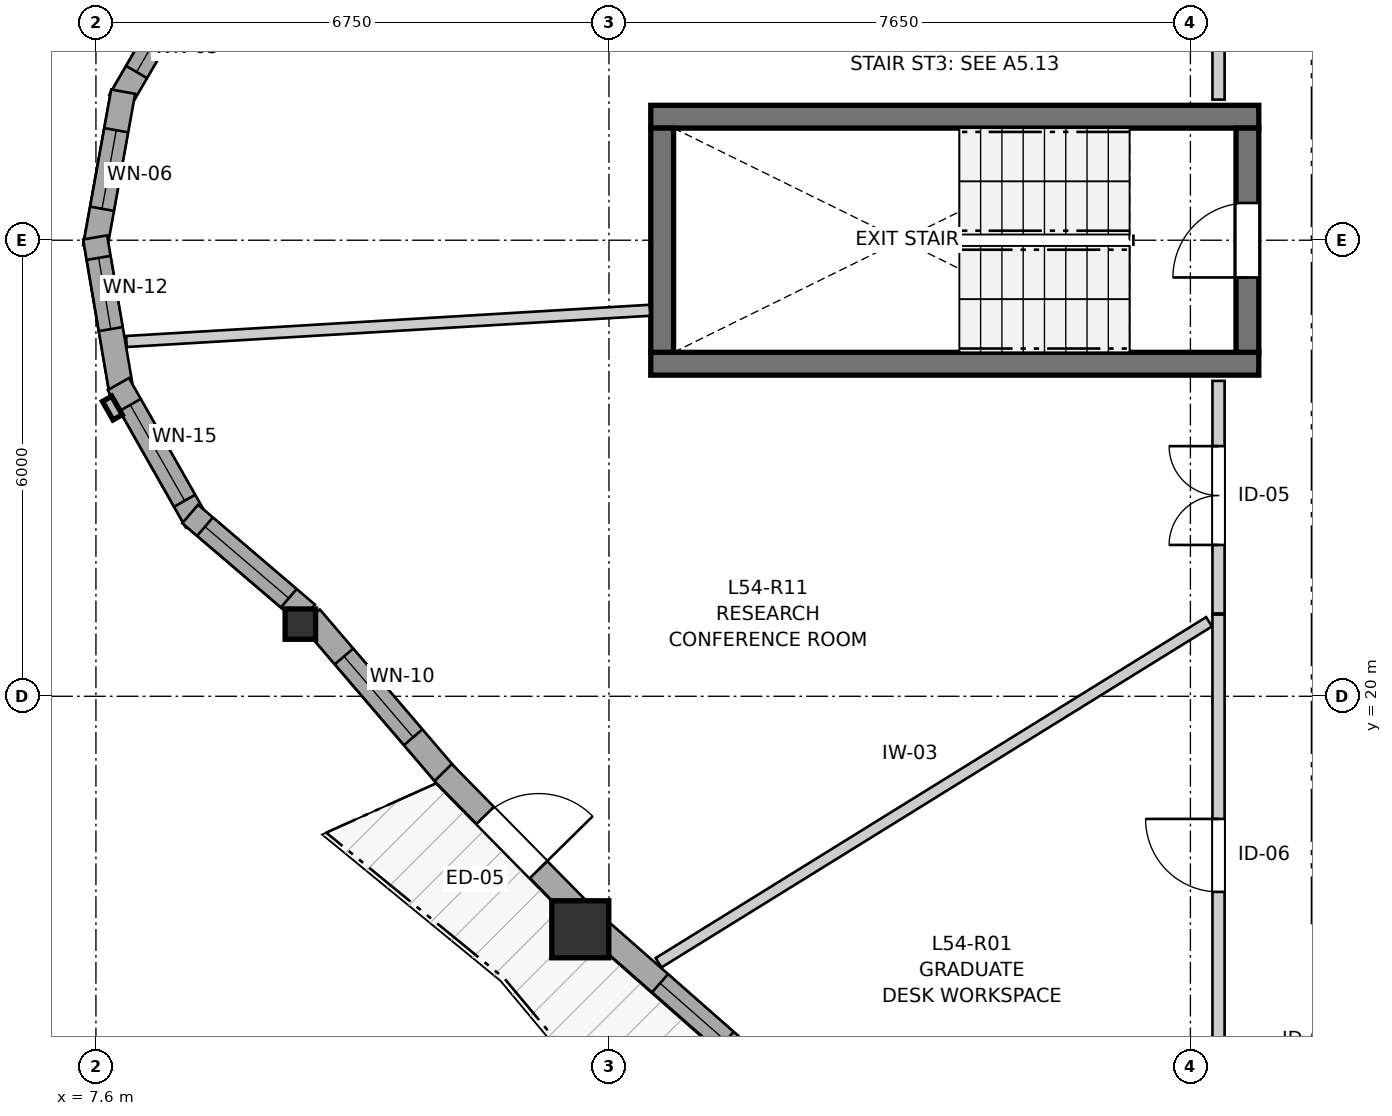
"""IFC4 building model, lengths in metres.
Left out: names, types, materials, properties, quantities, classifications, styles, units other than length and angle.
Written with IfcOpenShell. Run it as: python <this file> out.ifc"""

import sys

from ifc_helpers import new_model, si_unit, direction, frame, frame_2d, origin, origin_2d, place, context, subcontext, project, spatial, rectangle, i_section, extrude, source, transform, mapped, element, fill, save


model = new_model("IFC4")
c1 = context("Model", 3, precision=1e-05, world=origin(), true_north=direction((0.0, 1.0)))
c2 = subcontext(c1, "Body", "Model", "MODEL_VIEW")
j1 = project(units=[si_unit("LENGTHUNIT", "METRE"), si_unit("PLANEANGLEUNIT", "RADIAN")], contexts=[c1])
p1 = place(None, origin())
s1 = spatial("IfcSite", under=j1, at=p1, CompositionType="ELEMENT")
p2 = place(p1, origin())
s2 = spatial("IfcBuilding", under=s1, at=p2, CompositionType="ELEMENT")
p3 = place(p2, frame((0.0, 0.0, 181.0)))
s3 = spatial("IfcBuildingStorey", under=s2, at=p3, CompositionType="ELEMENT", Elevation=181.0)
for number, where, z_axis, x_axis in (
    (1, (14.9, 24.375, 0.0), (0.0, 0.0, 1.0), (1.0, 0.0, 0.0)),
    (2, (22.9, 27.625, 0.0), (0.0, 0.0, 1.0), (-1.0, 0.0, 0.0)),
):
    element("IfcWall", number, at=place(p3, frame(where, z_axis=z_axis, x_axis=x_axis)), inside=s3, PredefinedType="SHEAR", context=c2, shape_type="SweptSolid", body=[
        extrude(rectangle(XDim=8.0, YDim=0.3, at=frame_2d((4.0, 0.0))), origin(), (0.0, 0.0, 1.0), 2.95),
    ])
p4 = place(p3, frame((15.05, 27.475, 0.0), z_axis=(0.0, 0.0, 1.0), x_axis=(0.0, -1.0, 0.0)))
e3 = element("IfcWall", 3, at=p4, inside=s3, PredefinedType="SHEAR", context=c2, shape_type="SweptSolid", body=[
    extrude(rectangle(XDim=2.95, YDim=0.3, at=frame_2d((1.475, 0.0))), origin(), (0.0, 0.0, 1.0), 2.95),
])
p5 = place(p3, frame((22.75, 24.525, 0.0), z_axis=(0.0, 0.0, 1.0), x_axis=(0.0, 1.0, 0.0)))
e4 = element("IfcWall", 4, at=p5, inside=s3, PredefinedType="SHEAR", context=c2, shape_type="SweptSolid", body=[
    extrude(rectangle(XDim=2.95, YDim=0.3, at=frame_2d((1.475, 0.0))), origin(), (0.0, 0.0, 1.0), 2.95),
])
p6 = place(p5, frame((0.985, 0.0, 0.0)))
e5 = element("IfcOpeningElement", 5, at=p6, cuts=e4, PredefinedType="OPENING", context=c2, shape_type="SweptSolid", body=[
    extrude(rectangle(XDim=0.98, YDim=2.15, at=frame_2d((0.49, 1.075))), frame((0.0, 0.16, 0.0), z_axis=(0.0, -1.0, 0.0), x_axis=(1.0, 0.0, 0.0)), (0.0, 0.0, 1.0), 0.32),
])
m1 = source(origin(), c2, "Body", "SweptSolid", [
    extrude(i_section(OverallWidth=0.401, OverallDepth=0.399, WebThickness=0.023, FlangeThickness=0.036, FilletRadius=0.015, at=origin_2d()), origin(), (0.0, 0.0, 1.0), 2.95),
])
p7 = place(p3, frame((10.289, 20.95, 0.0), z_axis=(0.0, 0.0, 1.0), x_axis=(1.0, 0.0, 0.0)))
e6 = element("IfcColumn", 6, at=p7, inside=s3, PredefinedType="PILASTER", context=c2, shape_type="MappedRepresentation", body=[
    mapped(m1, transform((0.0, 0.0, 0.0), x_axis=(1.0, 0.0, 0.0), y_axis=(0.0, 1.0, 0.0), z_axis=(0.0, 0.0, 1.0), scale=1.0)),
])
m2 = source(origin(), c2, "Body", "SweptSolid", [
    extrude(rectangle(XDim=0.75, YDim=0.75, at=origin_2d()), origin(), (0.0, 0.0, 1.0), 2.95),
])
p8 = place(p3, frame((13.973, 16.935, 0.0), z_axis=(0.0, 0.0, 1.0), x_axis=(1.0, 0.0, 0.0)))
e7 = element("IfcColumn", 7, at=p8, inside=s3, PredefinedType="COLUMN", context=c2, shape_type="MappedRepresentation", body=[
    mapped(m2, transform((0.0, 0.0, 0.0), x_axis=(1.0, 0.0, 0.0), y_axis=(0.0, 1.0, 0.0), z_axis=(0.0, 0.0, 1.0), scale=1.0)),
])
p9 = place(p3, frame((8.958, 29.632, 0.0), z_axis=(0.0, 0.0, 1.0), x_axis=(-0.502053430046, -0.864836605018, 0.0)))
e8 = element("IfcWall", 8, at=p9, inside=s3, PredefinedType="SOLIDWALL", context=c2, shape_type="SweptSolid", body=[
    extrude(rectangle(XDim=2.081, YDim=0.32, at=frame_2d((1.041, 0.0))), origin(), (0.0, 0.0, 1.0), 2.53),
])
p10 = place(p9, frame((0.44, 0.0, 0.82)))
e9 = element("IfcOpeningElement", 9, at=p10, cuts=e8, PredefinedType="OPENING", context=c2, shape_type="SweptSolid", body=[
    extrude(rectangle(XDim=1.2, YDim=1.45, at=frame_2d((0.6, 0.725))), frame((0.0, 0.17, 0.0), z_axis=(0.0, -1.0, 0.0), x_axis=(1.0, 0.0, 0.0)), (0.0, 0.0, 1.0), 0.34),
])
p11 = place(p3, frame((7.958, 27.954, 0.0), z_axis=(0.0, 0.0, 1.0), x_axis=(-0.177625721103, -0.984098116654, 0.0)))
e10 = element("IfcWall", 10, at=p11, inside=s3, PredefinedType="SOLIDWALL", context=c2, shape_type="SweptSolid", body=[
    extrude(rectangle(XDim=2.081, YDim=0.32, at=frame_2d((1.041, 0.0))), origin(), (0.0, 0.0, 1.0), 2.53),
])
p12 = place(p11, frame((0.515, 0.0, 0.82)))
e11 = element("IfcOpeningElement", 11, at=p12, cuts=e10, PredefinedType="OPENING", context=c2, shape_type="SweptSolid", body=[
    extrude(rectangle(XDim=1.05, YDim=1.45, at=frame_2d((0.525, 0.725))), frame((0.0, 0.17, 0.0), z_axis=(0.0, -1.0, 0.0), x_axis=(1.0, 0.0, 0.0)), (0.0, 0.0, 1.0), 0.34),
])
p13 = place(p3, frame((7.59, 26.037, 0.0), z_axis=(0.0, 0.0, 1.0), x_axis=(0.167993405511, -0.985788119073, 0.0)))
e12 = element("IfcWall", 12, at=p13, inside=s3, PredefinedType="SOLIDWALL", context=c2, shape_type="SweptSolid", body=[
    extrude(rectangle(XDim=2.081, YDim=0.32, at=frame_2d((1.041, 0.0))), origin(), (0.0, 0.0, 1.0), 2.53),
])
p14 = place(p13, frame((0.273, 0.0, 0.82)))
e13 = element("IfcOpeningElement", 13, at=p14, cuts=e12, PredefinedType="OPENING", context=c2, shape_type="SweptSolid", body=[
    extrude(rectangle(XDim=0.95, YDim=1.35, at=frame_2d((0.475, 0.675))), frame((0.0, 0.17, 0.0), z_axis=(0.0, -1.0, 0.0), x_axis=(1.0, 0.0, 0.0)), (0.0, 0.0, 1.0), 0.34),
])
p15 = place(p3, frame((7.896, 24.108, 0.0), z_axis=(0.0, 0.0, 1.0), x_axis=(0.493660675866, -0.869654607936, 0.0)))
e14 = element("IfcWall", 14, at=p15, inside=s3, PredefinedType="SOLIDWALL", context=c2, shape_type="SweptSolid", body=[
    extrude(rectangle(XDim=2.081, YDim=0.32, at=frame_2d((1.041, 0.0))), origin(), (0.0, 0.0, 1.0), 2.53),
])
p16 = place(p15, frame((0.315, 0.0, 0.82)))
e15 = element("IfcOpeningElement", 15, at=p16, cuts=e14, PredefinedType="OPENING", context=c2, shape_type="SweptSolid", body=[
    extrude(rectangle(XDim=1.45, YDim=1.25, at=frame_2d((0.725, 0.625))), frame((0.0, 0.17, 0.0), z_axis=(0.0, -1.0, 0.0), x_axis=(1.0, 0.0, 0.0)), (0.0, 0.0, 1.0), 0.34),
])
p17 = place(p3, frame((8.84, 22.398, 0.0), z_axis=(0.0, 0.0, 1.0), x_axis=(0.760328975209, -0.649538181678, 0.0)))
e16 = element("IfcWall", 16, at=p17, inside=s3, PredefinedType="SOLIDWALL", context=c2, shape_type="SweptSolid", body=[
    extrude(rectangle(XDim=2.023, YDim=0.32, at=frame_2d((1.011, 0.0))), origin(), (0.0, 0.0, 1.0), 2.53),
])
p18 = place(p17, frame((0.257, 0.0, 0.82)))
e17 = element("IfcOpeningElement", 17, at=p18, cuts=e16, PredefinedType="OPENING", context=c2, shape_type="SweptSolid", body=[
    extrude(rectangle(XDim=1.45, YDim=1.25, at=frame_2d((0.725, 0.625))), frame((0.0, 0.17, 0.0), z_axis=(0.0, -1.0, 0.0), x_axis=(1.0, 0.0, 0.0)), (0.0, 0.0, 1.0), 0.34),
])
p19 = place(p3, frame((10.424, 21.038, 0.0), z_axis=(0.0, 0.0, 1.0), x_axis=(0.650261869135, -0.759710143114, 0.0)))
e18 = element("IfcWall", 18, at=p19, inside=s3, PredefinedType="SOLIDWALL", context=c2, shape_type="SweptSolid", body=[
    extrude(rectangle(XDim=2.773, YDim=0.32, at=frame_2d((1.386, 0.0))), origin(), (0.0, 0.0, 1.0), 2.53),
])
p20 = place(p19, frame((0.677, 0.0, 0.82)))
e19 = element("IfcOpeningElement", 19, at=p20, cuts=e18, PredefinedType="OPENING", context=c2, shape_type="SweptSolid", body=[
    extrude(rectangle(XDim=1.4, YDim=1.35, at=frame_2d((0.7, 0.675))), frame((0.0, 0.17, 0.0), z_axis=(0.0, -1.0, 0.0), x_axis=(1.0, 0.0, 0.0)), (0.0, 0.0, 1.0), 0.34),
])
p21 = place(p3, frame((12.168, 18.996, 0.0), z_axis=(0.0, 0.0, 1.0), x_axis=(0.701479569818, -0.712689562943, 0.0)))
e20 = element("IfcWall", 20, at=p21, inside=s3, PredefinedType="SOLIDWALL", context=c2, shape_type="SweptSolid", body=[
    extrude(rectangle(XDim=2.57, YDim=0.32, at=frame_2d((1.285, 0.0))), origin(), (0.0, 0.0, 1.0), 2.53),
])
p22 = place(p21, frame((0.79, 0.0, 0.0)))
e21 = element("IfcOpeningElement", 21, at=p22, cuts=e20, PredefinedType="OPENING", context=c2, shape_type="SweptSolid", body=[
    extrude(rectangle(XDim=1.0, YDim=2.1, at=frame_2d((0.5, 1.05))), frame((0.0, 0.17, 0.0), z_axis=(0.0, -1.0, 0.0), x_axis=(1.0, 0.0, 0.0)), (0.0, 0.0, 1.0), 0.34),
])
p23 = place(p3, frame((14.202, 16.946, 0.0), z_axis=(0.0, 0.0, 1.0), x_axis=(0.751119873672, -0.660165839297, 0.0)))
e22 = element("IfcWall", 22, at=p23, inside=s3, PredefinedType="SOLIDWALL", context=c2, shape_type="SweptSolid", body=[
    extrude(rectangle(XDim=2.526, YDim=0.32, at=frame_2d((1.263, 0.0))), origin(), (0.0, 0.0, 1.0), 2.53),
])
p24 = place(p23, frame((1.092, 0.0, 0.82)))
e23 = element("IfcOpeningElement", 23, at=p24, cuts=e22, PredefinedType="OPENING", context=c2, shape_type="SweptSolid", body=[
    extrude(rectangle(XDim=1.15, YDim=1.2, at=frame_2d((0.575, 0.6))), frame((0.0, 0.17, 0.0), z_axis=(0.0, -1.0, 0.0), x_axis=(1.0, 0.0, 0.0)), (0.0, 0.0, 1.0), 0.34),
])
p25 = place(p3, frame((22.37, 27.85, 0.0), z_axis=(0.0, 0.0, 1.0), x_axis=(0.0, 1.0, 0.0)))
e24 = element("IfcWall", 24, at=p25, inside=s3, PredefinedType="PARTITIONING", context=c2, shape_type="SweptSolid", body=[
    extrude(rectangle(XDim=6.6, YDim=0.16, at=frame_2d((3.3, 0.0))), origin(), (0.0, 0.0, 1.0), 2.95),
])
p26 = place(p25, frame((2.981, 0.0, 0.0)))
e25 = element("IfcOpeningElement", 25, at=p26, cuts=e24, PredefinedType="OPENING", context=c2, shape_type="SweptSolid", body=[
    extrude(rectangle(XDim=1.3, YDim=2.1, at=frame_2d((0.65, 1.05))), frame((0.0, 0.09, 0.0), z_axis=(0.0, -1.0, 0.0), x_axis=(1.0, 0.0, 0.0)), (0.0, 0.0, 1.0), 0.18),
])
p27 = place(p3, frame((22.37, 14.73, 0.0), z_axis=(0.0, 0.0, 1.0), x_axis=(0.0, 1.0, 0.0)))
e26 = element("IfcWall", 26, at=p27, inside=s3, PredefinedType="PARTITIONING", context=c2, shape_type="SweptSolid", body=[
    extrude(rectangle(XDim=6.345, YDim=0.16, at=frame_2d((3.172, 0.0))), origin(), (0.0, 0.0, 1.0), 2.95),
])
p28 = place(p27, frame((2.697, 0.0, 0.0)))
e27 = element("IfcOpeningElement", 27, at=p28, cuts=e26, PredefinedType="OPENING", context=c2, shape_type="SweptSolid", body=[
    extrude(rectangle(XDim=0.96, YDim=2.1, at=frame_2d((0.48, 1.05))), frame((0.0, 0.09, 0.0), z_axis=(0.0, -1.0, 0.0), x_axis=(1.0, 0.0, 0.0)), (0.0, 0.0, 1.0), 0.18),
])
p29 = place(p3, frame((22.37, 21.09, 0.0), z_axis=(0.0, 0.0, 1.0), x_axis=(0.0, 1.0, 0.0)))
e28 = element("IfcWall", 28, at=p29, inside=s3, PredefinedType="PARTITIONING", context=c2, shape_type="SweptSolid", body=[
    extrude(rectangle(XDim=3.06, YDim=0.16, at=frame_2d((1.53, 0.0))), origin(), (0.0, 0.0, 1.0), 2.95),
])
p30 = place(p29, frame((0.901, 0.0, 0.0)))
e29 = element("IfcOpeningElement", 29, at=p30, cuts=e28, PredefinedType="OPENING", context=c2, shape_type="SweptSolid", body=[
    extrude(rectangle(XDim=1.3, YDim=2.1, at=frame_2d((0.65, 1.05))), frame((0.0, 0.09, 0.0), z_axis=(0.0, -1.0, 0.0), x_axis=(1.0, 0.0, 0.0)), (0.0, 0.0, 1.0), 0.18),
])
p31 = place(p3, frame((15.002, 16.494, 0.0), z_axis=(0.0, 0.0, 1.0), x_axis=(0.850179022177, 0.5264937134, 0.0)))
e30 = element("IfcWall", 30, at=p31, inside=s3, PredefinedType="PARTITIONING", context=c2, shape_type="SweptSolid", body=[
    extrude(rectangle(XDim=8.519, YDim=0.145, at=frame_2d((4.26, 0.0))), origin(), (0.0, 0.0, 1.0), 2.95),
])
p32 = place(p3, frame((8.001, 24.667, 0.0), z_axis=(0.0, 0.0, 1.0), x_axis=(0.998224720456, 0.059560116444, 0.0)))
e31 = element("IfcWall", 31, at=p32, inside=s3, PredefinedType="PARTITIONING", context=c2, shape_type="SweptSolid", body=[
    extrude(rectangle(XDim=6.899, YDim=0.145, at=frame_2d((3.449, 0.0))), origin(), (0.0, 0.0, 1.0), 2.95),
])
m3 = source(origin(), c2, "Body", "SweptSolid", [
    extrude(rectangle(XDim=1.2, YDim=1.45, at=frame_2d((0.6, 0.725))), frame((0.0, 0.03, 0.0), z_axis=(0.0, -1.0, 0.0), x_axis=(1.0, 0.0, 0.0)), (0.0, 0.0, 1.0), 0.06),
])
p33 = place(p10, origin())
e32 = element("IfcWindow", 32, at=p33, inside=s3, PartitioningType="SINGLE_PANEL", PredefinedType="WINDOW", context=c2, shape_type="MappedRepresentation", body=[
    mapped(m3, transform((0.0, 0.0, 0.0), x_axis=(1.0, 0.0, 0.0), y_axis=(0.0, 1.0, 0.0), z_axis=(0.0, 0.0, 1.0), scale=1.0)),
])
fill(e9, e32)
m4 = source(origin(), c2, "Body", "SweptSolid", [
    extrude(rectangle(XDim=1.05, YDim=1.45, at=frame_2d((0.525, 0.725))), frame((0.0, 0.03, 0.0), z_axis=(0.0, -1.0, 0.0), x_axis=(1.0, 0.0, 0.0)), (0.0, 0.0, 1.0), 0.06),
])
p34 = place(p12, origin())
e33 = element("IfcWindow", 33, at=p34, inside=s3, PartitioningType="SINGLE_PANEL", PredefinedType="WINDOW", context=c2, shape_type="MappedRepresentation", body=[
    mapped(m4, transform((0.0, 0.0, 0.0), x_axis=(1.0, 0.0, 0.0), y_axis=(0.0, 1.0, 0.0), z_axis=(0.0, 0.0, 1.0), scale=1.0)),
])
fill(e11, e33)
m5 = source(origin(), c2, "Body", "SweptSolid", [
    extrude(rectangle(XDim=0.95, YDim=1.35, at=frame_2d((0.475, 0.675))), frame((0.0, 0.03, 0.0), z_axis=(0.0, -1.0, 0.0), x_axis=(1.0, 0.0, 0.0)), (0.0, 0.0, 1.0), 0.06),
])
p35 = place(p14, origin())
e34 = element("IfcWindow", 34, at=p35, inside=s3, PartitioningType="SINGLE_PANEL", PredefinedType="WINDOW", context=c2, shape_type="MappedRepresentation", body=[
    mapped(m5, transform((0.0, 0.0, 0.0), x_axis=(1.0, 0.0, 0.0), y_axis=(0.0, 1.0, 0.0), z_axis=(0.0, 0.0, 1.0), scale=1.0)),
])
fill(e13, e34)
m6 = source(origin(), c2, "Body", "SweptSolid", [
    extrude(rectangle(XDim=1.45, YDim=1.25, at=frame_2d((0.725, 0.625))), frame((0.0, 0.03, 0.0), z_axis=(0.0, -1.0, 0.0), x_axis=(1.0, 0.0, 0.0)), (0.0, 0.0, 1.0), 0.06),
])
p36 = place(p16, origin())
e35 = element("IfcWindow", 35, at=p36, inside=s3, PartitioningType="SINGLE_PANEL", PredefinedType="WINDOW", context=c2, shape_type="MappedRepresentation", body=[
    mapped(m6, transform((0.0, 0.0, 0.0), x_axis=(1.0, 0.0, 0.0), y_axis=(0.0, 1.0, 0.0), z_axis=(0.0, 0.0, 1.0), scale=1.0)),
])
fill(e15, e35)
p37 = place(p18, origin())
e36 = element("IfcWindow", 36, at=p37, inside=s3, PartitioningType="SINGLE_PANEL", PredefinedType="WINDOW", context=c2, shape_type="MappedRepresentation", body=[
    mapped(m6, transform((0.0, 0.0, 0.0), x_axis=(1.0, 0.0, 0.0), y_axis=(0.0, 1.0, 0.0), z_axis=(0.0, 0.0, 1.0), scale=1.0)),
])
fill(e17, e36)
m7 = source(origin(), c2, "Body", "SweptSolid", [
    extrude(rectangle(XDim=1.4, YDim=1.35, at=frame_2d((0.7, 0.675))), frame((0.0, 0.03, 0.0), z_axis=(0.0, -1.0, 0.0), x_axis=(1.0, 0.0, 0.0)), (0.0, 0.0, 1.0), 0.06),
])
p38 = place(p20, origin())
e37 = element("IfcWindow", 37, at=p38, inside=s3, PartitioningType="SINGLE_PANEL", PredefinedType="WINDOW", context=c2, shape_type="MappedRepresentation", body=[
    mapped(m7, transform((0.0, 0.0, 0.0), x_axis=(1.0, 0.0, 0.0), y_axis=(0.0, 1.0, 0.0), z_axis=(0.0, 0.0, 1.0), scale=1.0)),
])
fill(e19, e37)
m8 = source(origin(), c2, "Body", "SweptSolid", [
    extrude(rectangle(XDim=1.0, YDim=2.1, at=frame_2d((0.5, 1.05))), frame((0.0, 0.025, 0.0), z_axis=(0.0, -1.0, 0.0), x_axis=(1.0, 0.0, 0.0)), (0.0, 0.0, 1.0), 0.05),
])
p39 = place(p22, origin())
e38 = element("IfcDoor", 38, at=p39, inside=s3, OperationType="SINGLE_SWING_RIGHT", PredefinedType="DOOR", context=c2, shape_type="MappedRepresentation", body=[
    mapped(m8, transform((0.0, 0.0, 0.0), x_axis=(1.0, 0.0, 0.0), y_axis=(0.0, 1.0, 0.0), z_axis=(0.0, 0.0, 1.0), scale=1.0)),
])
fill(e21, e38)
m9 = source(origin(), c2, "Body", "SweptSolid", [
    extrude(rectangle(XDim=1.15, YDim=1.2, at=frame_2d((0.575, 0.6))), frame((0.0, 0.03, 0.0), z_axis=(0.0, -1.0, 0.0), x_axis=(1.0, 0.0, 0.0)), (0.0, 0.0, 1.0), 0.06),
])
p40 = place(p24, origin())
e39 = element("IfcWindow", 39, at=p40, inside=s3, PartitioningType="SINGLE_PANEL", PredefinedType="WINDOW", context=c2, shape_type="MappedRepresentation", body=[
    mapped(m9, transform((0.0, 0.0, 0.0), x_axis=(1.0, 0.0, 0.0), y_axis=(0.0, 1.0, 0.0), z_axis=(0.0, 0.0, 1.0), scale=1.0)),
])
fill(e23, e39)
m10 = source(origin(), c2, "Body", "SweptSolid", [
    extrude(rectangle(XDim=0.98, YDim=2.15, at=frame_2d((0.49, 1.075))), frame((0.0, 0.025, 0.0), z_axis=(0.0, -1.0, 0.0), x_axis=(1.0, 0.0, 0.0)), (0.0, 0.0, 1.0), 0.05),
])
p41 = place(p6, origin())
e40 = element("IfcDoor", 40, at=p41, inside=s3, OperationType="SINGLE_SWING_LEFT", PredefinedType="DOOR", context=c2, shape_type="MappedRepresentation", body=[
    mapped(m10, transform((0.0, 0.0, 0.0), x_axis=(1.0, 0.0, 0.0), y_axis=(0.0, 1.0, 0.0), z_axis=(0.0, 0.0, 1.0), scale=1.0)),
])
fill(e5, e40)
m11 = source(origin(), c2, "Body", "SweptSolid", [
    extrude(rectangle(XDim=0.96, YDim=2.1, at=frame_2d((0.48, 1.05))), frame((0.0, 0.025, 0.0), z_axis=(0.0, -1.0, 0.0), x_axis=(1.0, 0.0, 0.0)), (0.0, 0.0, 1.0), 0.05),
])
p42 = place(p28, origin())
e41 = element("IfcDoor", 41, at=p42, inside=s3, OperationType="SINGLE_SWING_RIGHT", PredefinedType="DOOR", context=c2, shape_type="MappedRepresentation", body=[
    mapped(m11, transform((0.0, 0.0, 0.0), x_axis=(1.0, 0.0, 0.0), y_axis=(0.0, 1.0, 0.0), z_axis=(0.0, 0.0, 1.0), scale=1.0)),
])
fill(e27, e41)
m12 = source(origin(), c2, "Body", "SweptSolid", [
    extrude(rectangle(XDim=1.3, YDim=2.1, at=frame_2d((0.65, 1.05))), frame((0.0, 0.025, 0.0), z_axis=(0.0, -1.0, 0.0), x_axis=(1.0, 0.0, 0.0)), (0.0, 0.0, 1.0), 0.05),
])
p43 = place(p30, origin())
e42 = element("IfcDoor", 42, at=p43, inside=s3, OperationType="DOUBLE_DOOR_SINGLE_SWING", PredefinedType="DOOR", context=c2, shape_type="MappedRepresentation", body=[
    mapped(m12, transform((0.0, 0.0, 0.0), x_axis=(1.0, 0.0, 0.0), y_axis=(0.0, 1.0, 0.0), z_axis=(0.0, 0.0, 1.0), scale=1.0)),
])
fill(e29, e42)
save(model, sys.argv[1])
